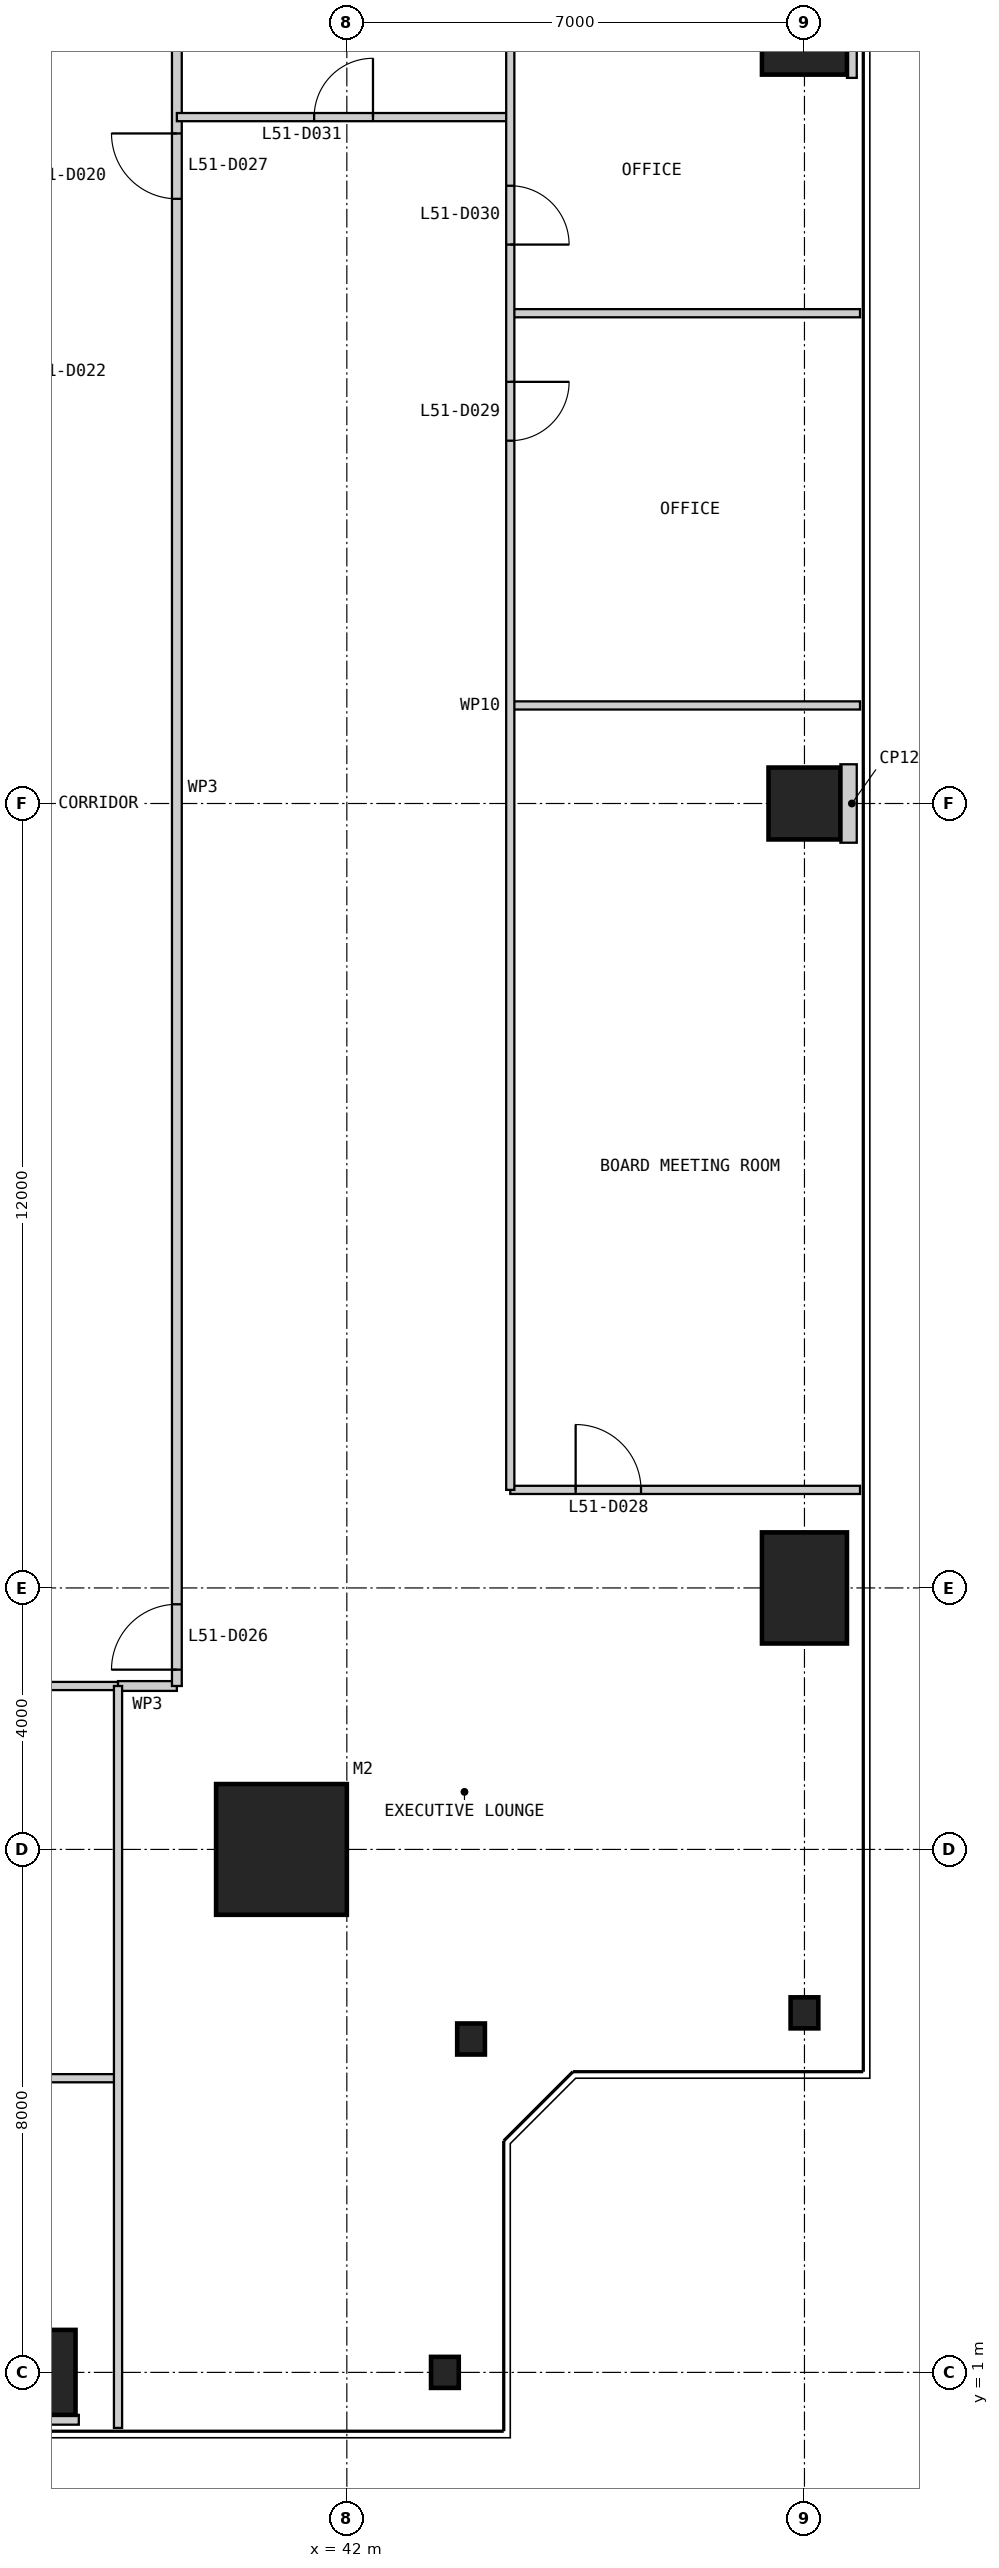
"""IFC4 building model, lengths in metres.
Left out: names, types, materials, properties, quantities, classifications, styles, units other than length and angle.
Written with IfcOpenShell. Run it as: python <this file> out.ifc"""

import sys

from ifc_helpers import new_model, si_unit, direction, frame, frame_2d, origin, origin_2d, place, context, subcontext, project, spatial, rectangle, i_section, extrude, element, fill, save


model = new_model("IFC4")
c1 = context("Model", 3, precision=1e-05, world=origin(), true_north=direction((0.0, 1.0)))
c2 = subcontext(c1, "Body", "Model", "MODEL_VIEW")
j1 = project(units=[si_unit("LENGTHUNIT", "METRE"), si_unit("PLANEANGLEUNIT", "RADIAN")], contexts=[c1])
p1 = place(None, origin())
s1 = spatial("IfcSite", under=j1, at=p1, CompositionType="ELEMENT")
p2 = place(p1, origin())
s2 = spatial("IfcBuilding", under=s1, at=p2, CompositionType="ELEMENT")
p3 = place(p2, frame((0.0, 0.0, 217.8)))
s3 = spatial("IfcBuildingStorey", under=s2, at=p3, CompositionType="ELEMENT", Elevation=217.8)
p4 = place(p3, frame((41.0, 9.0, 0.0), z_axis=(0.0, 0.0, 1.0), x_axis=(1.0, 0.0, 0.0)))
e1 = element("IfcColumn", 1, at=p4, inside=s3, PredefinedType="COLUMN", context=c2, shape_type="SweptSolid", body=[
    extrude(rectangle(XDim=2.0, YDim=2.0, at=origin_2d()), origin(), (0.0, 0.0, 1.0), 4.0),
])
p5 = place(p3, frame((37.0, 1.0, 0.0), z_axis=(0.0, 0.0, 1.0), x_axis=(1.0, 0.0, 0.0)))
e2 = element("IfcColumn", 2, at=p5, inside=s3, PredefinedType="COLUMN", context=c2, shape_type="SweptSolid", body=[
    extrude(rectangle(XDim=1.7, YDim=1.3, at=origin_2d()), origin(), (0.0, 0.0, 1.0), 4.0),
])
for number, where, z_axis, x_axis in (
    (3, (43.5, 1.0, 0.0), (0.0, 0.0, 1.0), (1.0, 0.0, 0.0)),
    (4, (43.9, 6.1, 0.0), (0.0, 0.0, 1.0), (1.0, 0.0, 0.0)),
    (5, (49.0, 6.5, 0.0), (0.0, 0.0, 1.0), (1.0, 0.0, 0.0)),
):
    element("IfcColumn", number, at=place(p3, frame(where, z_axis=z_axis, x_axis=x_axis)), inside=s3, PredefinedType="COLUMN", context=c2, shape_type="SweptSolid", body=[
        extrude(i_section(OverallWidth=0.424, OverallDepth=0.475, WebThickness=0.048, FlangeThickness=0.077, at=origin_2d()), origin(), (0.0, 0.0, 1.0), 4.0),
    ])
p6 = place(p3, frame((49.0, 13.0, 0.0), z_axis=(0.0, 0.0, 1.0), x_axis=(1.0, 0.0, 0.0)))
e6 = element("IfcColumn", 6, at=p6, inside=s3, PredefinedType="COLUMN", context=c2, shape_type="SweptSolid", body=[
    extrude(rectangle(XDim=1.3, YDim=1.7, at=origin_2d()), origin(), (0.0, 0.0, 1.0), 4.0),
])
p7 = place(p3, frame((49.0, 25.0, 0.0), z_axis=(0.0, 0.0, 1.0), x_axis=(1.0, 0.0, 0.0)))
e7 = element("IfcColumn", 7, at=p7, inside=s3, PredefinedType="COLUMN", context=c2, shape_type="SweptSolid", body=[
    extrude(rectangle(XDim=1.1, YDim=1.1, at=origin_2d()), origin(), (0.0, 0.0, 1.0), 4.0),
])
p8 = place(p3, frame((49.0, 37.0, 0.0), z_axis=(0.0, 0.0, 1.0), x_axis=(1.0, 0.0, 0.0)))
e8 = element("IfcColumn", 8, at=p8, inside=s3, PredefinedType="COLUMN", context=c2, shape_type="SweptSolid", body=[
    extrude(rectangle(XDim=1.3, YDim=1.7, at=origin_2d()), origin(), (0.0, 0.0, 1.0), 4.0),
])
p9 = place(p3, frame((32.5, 5.5, 0.0), z_axis=(0.0, 0.0, 1.0), x_axis=(1.0, 0.0, 0.0)))
e9 = element("IfcWall", 9, at=p9, inside=s3, PredefinedType="PARTITIONING", context=c2, shape_type="SweptSolid", body=[
    extrude(rectangle(XDim=6.0, YDim=0.125, at=frame_2d((3.0, 0.0))), origin(), (0.0, 0.0, 1.0), 3.85),
])
p10 = place(p3, frame((35.5, 11.5, 0.0), z_axis=(0.0, 0.0, 1.0), x_axis=(1.0, 0.0, 0.0)))
e10 = element("IfcWall", 10, at=p10, inside=s3, PredefinedType="PARTITIONING", context=c2, shape_type="SweptSolid", body=[
    extrude(rectangle(XDim=3.0, YDim=0.125, at=frame_2d((1.5, 0.0))), origin(), (0.0, 0.0, 1.0), 3.85),
])
p11 = place(p3, frame((38.5, 11.5, 0.0), z_axis=(0.0, 0.0, 1.0), x_axis=(1.0, 0.0, 0.0)))
e11 = element("IfcWall", 11, at=p11, inside=s3, PredefinedType="PARTITIONING", context=c2, shape_type="SweptSolid", body=[
    extrude(rectangle(XDim=0.9, YDim=0.15, at=frame_2d((0.45, 0.0))), origin(), (0.0, 0.0, 1.0), 3.85),
])
p12 = place(p3, frame((39.4, 11.5, 0.0), z_axis=(0.0, 0.0, 1.0), x_axis=(0.0, 1.0, 0.0)))
e12 = element("IfcWall", 12, at=p12, inside=s3, PredefinedType="PARTITIONING", context=c2, shape_type="SweptSolid", body=[
    extrude(rectangle(XDim=27.0, YDim=0.15, at=frame_2d((13.5, 0.0))), origin(), (0.0, 0.0, 1.0), 3.85),
])
p13 = place(p12, frame((0.25, 0.0, 0.0)))
e13 = element("IfcOpeningElement", 13, at=p13, cuts=e12, PredefinedType="OPENING", context=c2, shape_type="SweptSolid", body=[
    extrude(rectangle(XDim=1.0, YDim=2.2, at=frame_2d((0.5, 1.1))), frame((0.0, 0.085, 0.0), z_axis=(0.0, -1.0, 0.0), x_axis=(1.0, 0.0, 0.0)), (0.0, 0.0, 1.0), 0.17),
])
p14 = place(p12, frame((22.75, 0.0, 0.0)))
e14 = element("IfcOpeningElement", 14, at=p14, cuts=e12, PredefinedType="OPENING", context=c2, shape_type="SweptSolid", body=[
    extrude(rectangle(XDim=1.0, YDim=2.2, at=frame_2d((0.5, 1.1))), frame((0.0, 0.085, 0.0), z_axis=(0.0, -1.0, 0.0), x_axis=(1.0, 0.0, 0.0)), (0.0, 0.0, 1.0), 0.17),
])
p15 = place(p3, frame((38.5, 0.15, 0.0), z_axis=(0.0, 0.0, 1.0), x_axis=(0.0, 1.0, 0.0)))
e15 = element("IfcWall", 15, at=p15, inside=s3, PredefinedType="PARTITIONING", context=c2, shape_type="SweptSolid", body=[
    extrude(rectangle(XDim=11.35, YDim=0.125, at=frame_2d((5.675, 0.0))), origin(), (0.0, 0.0, 1.0), 3.85),
])
p16 = place(p3, frame((49.85, 14.5, 0.0), z_axis=(0.0, 0.0, 1.0), x_axis=(-1.0, 0.0, 0.0)))
e16 = element("IfcWall", 16, at=p16, inside=s3, PredefinedType="PARTITIONING", context=c2, shape_type="SweptSolid", body=[
    extrude(rectangle(XDim=5.35, YDim=0.125, at=frame_2d((2.675, 0.0))), origin(), (0.0, 0.0, 1.0), 3.85),
])
p17 = place(p16, frame((3.35, 0.0, 0.0)))
e17 = element("IfcOpeningElement", 17, at=p17, cuts=e16, PredefinedType="OPENING", context=c2, shape_type="SweptSolid", body=[
    extrude(rectangle(XDim=1.0, YDim=2.2, at=frame_2d((0.5, 1.1))), frame((0.0, 0.073, 0.0), z_axis=(0.0, -1.0, 0.0), x_axis=(1.0, 0.0, 0.0)), (0.0, 0.0, 1.0), 0.145),
])
for number, where, z_axis, x_axis in (
    (18, (49.85, 26.5, 0.0), (0.0, 0.0, 1.0), (-1.0, 0.0, 0.0)),
    (19, (49.85, 32.5, 0.0), (0.0, 0.0, 1.0), (-1.0, 0.0, 0.0)),
):
    element("IfcWall", number, at=place(p3, frame(where, z_axis=z_axis, x_axis=x_axis)), inside=s3, PredefinedType="PARTITIONING", context=c2, shape_type="SweptSolid", body=[
        extrude(rectangle(XDim=5.35, YDim=0.125, at=frame_2d((2.675, 0.0))), origin(), (0.0, 0.0, 1.0), 3.85),
    ])
p18 = place(p3, frame((44.5, 35.5, 0.0), z_axis=(0.0, 0.0, 1.0), x_axis=(-1.0, 0.0, 0.0)))
e20 = element("IfcWall", 20, at=p18, inside=s3, PredefinedType="PARTITIONING", context=c2, shape_type="SweptSolid", body=[
    extrude(rectangle(XDim=5.1, YDim=0.125, at=frame_2d((2.55, 0.0))), origin(), (0.0, 0.0, 1.0), 3.85),
])
p19 = place(p18, frame((2.1, 0.0, 0.0)))
e21 = element("IfcOpeningElement", 21, at=p19, cuts=e20, PredefinedType="OPENING", context=c2, shape_type="SweptSolid", body=[
    extrude(rectangle(XDim=0.9, YDim=2.2, at=frame_2d((0.45, 1.1))), frame((0.0, 0.073, 0.0), z_axis=(0.0, -1.0, 0.0), x_axis=(1.0, 0.0, 0.0)), (0.0, 0.0, 1.0), 0.145),
])
p20 = place(p3, frame((44.5, 14.5, 0.0), z_axis=(0.0, 0.0, 1.0), x_axis=(0.0, 1.0, 0.0)))
e22 = element("IfcWall", 22, at=p20, inside=s3, PredefinedType="PARTITIONING", context=c2, shape_type="SweptSolid", body=[
    extrude(rectangle(XDim=24.0, YDim=0.125, at=frame_2d((12.0, 0.0))), origin(), (0.0, 0.0, 1.0), 3.85),
])
p21 = place(p20, frame((16.05, 0.0, 0.0)))
e23 = element("IfcOpeningElement", 23, at=p21, cuts=e22, PredefinedType="OPENING", context=c2, shape_type="SweptSolid", body=[
    extrude(rectangle(XDim=0.9, YDim=2.2, at=frame_2d((0.45, 1.1))), frame((0.0, 0.073, 0.0), z_axis=(0.0, -1.0, 0.0), x_axis=(1.0, 0.0, 0.0)), (0.0, 0.0, 1.0), 0.145),
])
p22 = place(p20, frame((19.05, 0.0, 0.0)))
e24 = element("IfcOpeningElement", 24, at=p22, cuts=e22, PredefinedType="OPENING", context=c2, shape_type="SweptSolid", body=[
    extrude(rectangle(XDim=0.9, YDim=2.2, at=frame_2d((0.45, 1.1))), frame((0.0, 0.073, 0.0), z_axis=(0.0, -1.0, 0.0), x_axis=(1.0, 0.0, 0.0)), (0.0, 0.0, 1.0), 0.145),
])
p23 = place(p3, frame((37.0, 0.2, 0.0), z_axis=(0.0, 0.0, 1.0), x_axis=(0.0, 1.0, 0.0)))
e25 = element("IfcWall", 25, at=p23, inside=s3, PredefinedType="PARTITIONING", context=c2, shape_type="SweptSolid", body=[
    extrude(rectangle(XDim=0.15, YDim=1.8, at=frame_2d((0.075, 0.0))), origin(), (0.0, 0.0, 1.0), 3.85),
])
p24 = place(p3, frame((49.8, 25.0, 0.0), z_axis=(0.0, 0.0, 1.0), x_axis=(-1.0, 0.0, 0.0)))
e26 = element("IfcWall", 26, at=p24, inside=s3, PredefinedType="PARTITIONING", context=c2, shape_type="SweptSolid", body=[
    extrude(rectangle(XDim=0.25, YDim=1.2, at=frame_2d((0.125, 0.0))), origin(), (0.0, 0.0, 1.0), 3.85),
])
p25 = place(p3, frame((49.8, 37.0, 0.0), z_axis=(0.0, 0.0, 1.0), x_axis=(-1.0, 0.0, 0.0)))
e27 = element("IfcWall", 27, at=p25, inside=s3, PredefinedType="PARTITIONING", context=c2, shape_type="SweptSolid", body=[
    extrude(rectangle(XDim=0.15, YDim=1.8, at=frame_2d((0.075, 0.0))), origin(), (0.0, 0.0, 1.0), 3.85),
])
p26 = place(p13, origin())
e28 = element("IfcDoor", 28, at=p26, inside=s3, OperationType="SINGLE_SWING_LEFT", PredefinedType="DOOR", context=c2, shape_type="SweptSolid", body=[
    extrude(rectangle(XDim=1.0, YDim=2.2, at=frame_2d((0.5, 1.1))), frame((0.0, 0.025, 0.0), z_axis=(0.0, -1.0, 0.0), x_axis=(1.0, 0.0, 0.0)), (0.0, 0.0, 1.0), 0.05),
])
fill(e13, e28)
p27 = place(p14, origin())
e29 = element("IfcDoor", 29, at=p27, inside=s3, OperationType="SINGLE_SWING_RIGHT", PredefinedType="DOOR", context=c2, shape_type="SweptSolid", body=[
    extrude(rectangle(XDim=1.0, YDim=2.2, at=frame_2d((0.5, 1.1))), frame((0.0, 0.025, 0.0), z_axis=(0.0, -1.0, 0.0), x_axis=(1.0, 0.0, 0.0)), (0.0, 0.0, 1.0), 0.05),
])
fill(e14, e29)
p28 = place(p17, frame((1.0, 0.0, 0.0), z_axis=(0.0, 0.0, 1.0), x_axis=(-1.0, 0.0, 0.0)))
e30 = element("IfcDoor", 30, at=p28, inside=s3, OperationType="SINGLE_SWING_LEFT", PredefinedType="DOOR", context=c2, shape_type="SweptSolid", body=[
    extrude(rectangle(XDim=1.0, YDim=2.2, at=frame_2d((0.5, 1.1))), frame((0.0, 0.025, 0.0), z_axis=(0.0, -1.0, 0.0), x_axis=(1.0, 0.0, 0.0)), (0.0, 0.0, 1.0), 0.05),
])
fill(e17, e30)
p29 = place(p21, frame((0.9, 0.0, 0.0), z_axis=(0.0, 0.0, 1.0), x_axis=(-1.0, 0.0, 0.0)))
e31 = element("IfcDoor", 31, at=p29, inside=s3, OperationType="SINGLE_SWING_LEFT", PredefinedType="DOOR", context=c2, shape_type="SweptSolid", body=[
    extrude(rectangle(XDim=0.9, YDim=2.2, at=frame_2d((0.45, 1.1))), frame((0.0, 0.025, 0.0), z_axis=(0.0, -1.0, 0.0), x_axis=(1.0, 0.0, 0.0)), (0.0, 0.0, 1.0), 0.05),
])
fill(e23, e31)
p30 = place(p22, frame((0.9, 0.0, 0.0), z_axis=(0.0, 0.0, 1.0), x_axis=(-1.0, 0.0, 0.0)))
e32 = element("IfcDoor", 32, at=p30, inside=s3, OperationType="SINGLE_SWING_RIGHT", PredefinedType="DOOR", context=c2, shape_type="SweptSolid", body=[
    extrude(rectangle(XDim=0.9, YDim=2.2, at=frame_2d((0.45, 1.1))), frame((0.0, 0.025, 0.0), z_axis=(0.0, -1.0, 0.0), x_axis=(1.0, 0.0, 0.0)), (0.0, 0.0, 1.0), 0.05),
])
fill(e24, e32)
p31 = place(p19, frame((0.9, 0.0, 0.0), z_axis=(0.0, 0.0, 1.0), x_axis=(-1.0, 0.0, 0.0)))
e33 = element("IfcDoor", 33, at=p31, inside=s3, OperationType="SINGLE_SWING_RIGHT", PredefinedType="DOOR", context=c2, shape_type="SweptSolid", body=[
    extrude(rectangle(XDim=0.9, YDim=2.2, at=frame_2d((0.45, 1.1))), frame((0.0, 0.025, 0.0), z_axis=(0.0, -1.0, 0.0), x_axis=(1.0, 0.0, 0.0)), (0.0, 0.0, 1.0), 0.05),
])
fill(e21, e33)
save(model, sys.argv[1])
